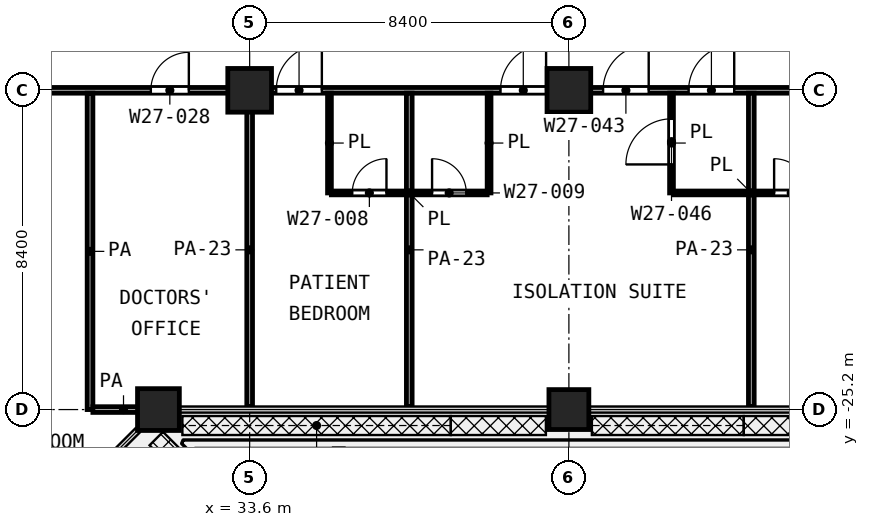
"""IFC4 building model, lengths in metres.
Left out: names, types, materials, properties, quantities, classifications, styles, units other than length and angle.
Written with IfcOpenShell. Run it as: python <this file> out.ifc"""

import sys

from ifc_helpers import new_model, si_unit, direction, frame, frame_2d, origin, origin_2d, place, context, subcontext, project, spatial, rectangle, extrude, element, fill, save


model = new_model("IFC4")
c1 = context("Model", 3, precision=1e-05, world=origin(), true_north=direction((0.0, 1.0)))
c2 = subcontext(c1, "Body", "Model", "MODEL_VIEW")
j1 = project(units=[si_unit("LENGTHUNIT", "METRE"), si_unit("PLANEANGLEUNIT", "RADIAN")], contexts=[c1])
p1 = place(None, origin())
s1 = spatial("IfcSite", under=j1, at=p1, CompositionType="ELEMENT")
p2 = place(p1, origin())
s2 = spatial("IfcBuilding", under=s1, at=p2, CompositionType="ELEMENT")
p3 = place(p2, frame((0.0, 0.0, 140.8)))
s3 = spatial("IfcBuildingStorey", under=s2, at=p3, CompositionType="ELEMENT", Elevation=140.8)
for number, where, z_axis, x_axis in (
    (1, (33.6, -16.8, 0.0), (0.0, 0.0, 1.0), (1.0, 0.0, 0.0)),
    (2, (42.0, -16.8, 0.0), (0.0, 0.0, 1.0), (1.0, 0.0, 0.0)),
):
    element("IfcColumn", number, at=place(p3, frame(where, z_axis=z_axis, x_axis=x_axis)), inside=s3, PredefinedType="COLUMN", context=c2, shape_type="SweptSolid", body=[
        extrude(rectangle(XDim=1.15, YDim=1.15, at=origin_2d()), origin(), (0.0, 0.0, 1.0), 4.2),
    ])
p4 = place(p3, frame((31.2, -25.2, 0.0), z_axis=(0.0, 0.0, 1.0), x_axis=(1.0, 0.0, 0.0)))
e3 = element("IfcColumn", 3, at=p4, inside=s3, PredefinedType="COLUMN", context=c2, shape_type="SweptSolid", body=[
    extrude(rectangle(XDim=1.1, YDim=1.1, at=origin_2d()), origin(), (0.0, 0.0, 1.0), 4.2),
])
p5 = place(p3, frame((42.0, -25.2, 0.0), z_axis=(0.0, 0.0, 1.0), x_axis=(1.0, 0.0, 0.0)))
e4 = element("IfcColumn", 4, at=p5, inside=s3, PredefinedType="COLUMN", context=c2, shape_type="SweptSolid", body=[
    extrude(rectangle(XDim=1.05, YDim=1.05, at=origin_2d()), origin(), (0.0, 0.0, 1.0), 4.2),
])
p6 = place(p3, frame((35.75, -19.5, 0.0), z_axis=(0.0, 0.0, 1.0), x_axis=(1.0, 0.0, 0.0)))
e5 = element("IfcWall", 5, at=p6, inside=s3, PredefinedType="PARTITIONING", context=c2, shape_type="SweptSolid", body=[
    extrude(rectangle(XDim=4.1, YDim=0.1, at=frame_2d((2.05, 0.0))), origin(), (0.0, 0.0, 1.0), 3.6),
])
p7 = place(p6, frame((0.55, 0.0, 0.0)))
e6 = element("IfcOpeningElement", 6, at=p7, cuts=e5, PredefinedType="OPENING", context=c2, shape_type="SweptSolid", body=[
    extrude(rectangle(XDim=0.9, YDim=2.1, at=frame_2d((0.45, 1.05))), frame((0.0, 0.06, 0.0), z_axis=(0.0, -1.0, 0.0), x_axis=(1.0, 0.0, 0.0)), (0.0, 0.0, 1.0), 0.12),
])
p8 = place(p6, frame((2.65, 0.0, 0.0)))
e7 = element("IfcOpeningElement", 7, at=p8, cuts=e5, PredefinedType="OPENING", context=c2, shape_type="SweptSolid", body=[
    extrude(rectangle(XDim=0.9, YDim=2.1, at=frame_2d((0.45, 1.05))), frame((0.0, 0.06, 0.0), z_axis=(0.0, -1.0, 0.0), x_axis=(1.0, 0.0, 0.0)), (0.0, 0.0, 1.0), 0.12),
])
p9 = place(p3, frame((44.75, -19.5, 0.0), z_axis=(0.0, 0.0, 1.0), x_axis=(1.0, 0.0, 0.0)))
e8 = element("IfcWall", 8, at=p9, inside=s3, PredefinedType="PARTITIONING", context=c2, shape_type="SweptSolid", body=[
    extrude(rectangle(XDim=4.1, YDim=0.1, at=frame_2d((2.05, 0.0))), origin(), (0.0, 0.0, 1.0), 3.6),
])
p10 = place(p9, frame((2.65, 0.0, 0.0)))
e9 = element("IfcOpeningElement", 9, at=p10, cuts=e8, PredefinedType="OPENING", context=c2, shape_type="SweptSolid", body=[
    extrude(rectangle(XDim=0.9, YDim=2.1, at=frame_2d((0.45, 1.05))), frame((0.0, 0.06, 0.0), z_axis=(0.0, -1.0, 0.0), x_axis=(1.0, 0.0, 0.0)), (0.0, 0.0, 1.0), 0.12),
])
for number, where, z_axis, x_axis in (
    (10, (35.7, -19.5, 0.0), (0.0, 0.0, 1.0), (0.0, 1.0, 0.0)),
    (11, (39.9, -19.5, 0.0), (0.0, 0.0, 1.0), (0.0, 1.0, 0.0)),
):
    element("IfcWall", number, at=place(p3, frame(where, z_axis=z_axis, x_axis=x_axis)), inside=s3, PredefinedType="PARTITIONING", context=c2, shape_type="SweptSolid", body=[
        extrude(rectangle(XDim=2.625, YDim=0.1, at=frame_2d((1.312, 0.0))), origin(), (0.0, 0.0, 1.0), 3.6),
    ])
p11 = place(p3, frame((44.7, -19.5, 0.0), z_axis=(0.0, 0.0, 1.0), x_axis=(0.0, 1.0, 0.0)))
e12 = element("IfcWall", 12, at=p11, inside=s3, PredefinedType="PARTITIONING", context=c2, shape_type="SweptSolid", body=[
    extrude(rectangle(XDim=2.625, YDim=0.1, at=frame_2d((1.312, 0.0))), origin(), (0.0, 0.0, 1.0), 3.6),
])
p12 = place(p11, frame((0.75, 0.0, 0.0)))
e13 = element("IfcOpeningElement", 13, at=p12, cuts=e12, PredefinedType="OPENING", context=c2, shape_type="SweptSolid", body=[
    extrude(rectangle(XDim=1.2, YDim=2.1, at=frame_2d((0.6, 1.05))), frame((0.0, 0.06, 0.0), z_axis=(0.0, -1.0, 0.0), x_axis=(1.0, 0.0, 0.0)), (0.0, 0.0, 1.0), 0.12),
])
p13 = place(p3, frame((29.475, -25.2, 0.0), z_axis=(0.0, 0.0, 1.0), x_axis=(1.0, 0.0, 0.0)))
e14 = element("IfcWall", 14, at=p13, inside=s3, PredefinedType="PARTITIONING", context=c2, shape_type="SweptSolid", body=[
    extrude(rectangle(XDim=1.612, YDim=0.15, at=frame_2d((0.806, 0.0))), origin(), (0.0, 0.0, 1.0), 3.6),
])
p14 = place(p3, frame((25.0, -16.8, 0.0), z_axis=(0.0, 0.0, 1.0), x_axis=(1.0, 0.0, 0.0)))
e15 = element("IfcWall", 15, at=p14, inside=s3, PredefinedType="PARTITIONING", context=c2, shape_type="SweptSolid", body=[
    extrude(rectangle(XDim=50.52, YDim=0.15, at=frame_2d((25.26, 0.0))), origin(), (0.0, 0.0, 1.0), 3.6),
])
p15 = place(p14, frame((1.55, 0.0, 0.0)))
e16 = element("IfcOpeningElement", 16, at=p15, cuts=e15, PredefinedType="OPENING", context=c2, shape_type="SweptSolid", body=[
    extrude(rectangle(XDim=1.5, YDim=2.1, at=frame_2d((0.75, 1.05))), frame((0.0, 0.085, 0.0), z_axis=(0.0, -1.0, 0.0), x_axis=(1.0, 0.0, 0.0)), (0.0, 0.0, 1.0), 0.17),
])
p16 = place(p14, frame((6.0, 0.0, 0.0)))
e17 = element("IfcOpeningElement", 17, at=p16, cuts=e15, PredefinedType="OPENING", context=c2, shape_type="SweptSolid", body=[
    extrude(rectangle(XDim=1.0, YDim=2.1, at=frame_2d((0.5, 1.05))), frame((0.0, 0.085, 0.0), z_axis=(0.0, -1.0, 0.0), x_axis=(1.0, 0.0, 0.0)), (0.0, 0.0, 1.0), 0.17),
])
p17 = place(p14, frame((9.3, 0.0, 0.0)))
e18 = element("IfcOpeningElement", 18, at=p17, cuts=e15, PredefinedType="OPENING", context=c2, shape_type="SweptSolid", body=[
    extrude(rectangle(XDim=1.2, YDim=2.1, at=frame_2d((0.6, 1.05))), frame((0.0, 0.085, 0.0), z_axis=(0.0, -1.0, 0.0), x_axis=(1.0, 0.0, 0.0)), (0.0, 0.0, 1.0), 0.17),
])
p18 = place(p14, frame((17.9, 0.0, 0.0)))
e19 = element("IfcOpeningElement", 19, at=p18, cuts=e15, PredefinedType="OPENING", context=c2, shape_type="SweptSolid", body=[
    extrude(rectangle(XDim=1.2, YDim=2.1, at=frame_2d((0.6, 1.05))), frame((0.0, 0.085, 0.0), z_axis=(0.0, -1.0, 0.0), x_axis=(1.0, 0.0, 0.0)), (0.0, 0.0, 1.0), 0.17),
])
p19 = place(p14, frame((15.2, 0.0, 0.0)))
e20 = element("IfcOpeningElement", 20, at=p19, cuts=e15, PredefinedType="OPENING", context=c2, shape_type="SweptSolid", body=[
    extrude(rectangle(XDim=1.2, YDim=2.1, at=frame_2d((0.6, 1.05))), frame((0.0, 0.085, 0.0), z_axis=(0.0, -1.0, 0.0), x_axis=(1.0, 0.0, 0.0)), (0.0, 0.0, 1.0), 0.17),
])
p20 = place(p14, frame((20.15, 0.0, 0.0)))
e21 = element("IfcOpeningElement", 21, at=p20, cuts=e15, PredefinedType="OPENING", context=c2, shape_type="SweptSolid", body=[
    extrude(rectangle(XDim=1.2, YDim=2.1, at=frame_2d((0.6, 1.05))), frame((0.0, 0.085, 0.0), z_axis=(0.0, -1.0, 0.0), x_axis=(1.0, 0.0, 0.0)), (0.0, 0.0, 1.0), 0.17),
])
p21 = place(p14, frame((26.025, 0.0, 0.0)))
e22 = element("IfcOpeningElement", 22, at=p21, cuts=e15, PredefinedType="OPENING", context=c2, shape_type="SweptSolid", body=[
    extrude(rectangle(XDim=0.9, YDim=2.1, at=frame_2d((0.45, 1.05))), frame((0.0, 0.085, 0.0), z_axis=(0.0, -1.0, 0.0), x_axis=(1.0, 0.0, 0.0)), (0.0, 0.0, 1.0), 0.17),
])
p22 = place(p14, frame((27.65, 0.0, 0.0)))
e23 = element("IfcOpeningElement", 23, at=p22, cuts=e15, PredefinedType="OPENING", context=c2, shape_type="SweptSolid", body=[
    extrude(rectangle(XDim=1.2, YDim=2.1, at=frame_2d((0.6, 1.05))), frame((0.0, 0.085, 0.0), z_axis=(0.0, -1.0, 0.0), x_axis=(1.0, 0.0, 0.0)), (0.0, 0.0, 1.0), 0.17),
])
p23 = place(p14, frame((32.0, 0.0, 0.0)))
e24 = element("IfcOpeningElement", 24, at=p23, cuts=e15, PredefinedType="OPENING", context=c2, shape_type="SweptSolid", body=[
    extrude(rectangle(XDim=1.2, YDim=2.1, at=frame_2d((0.6, 1.05))), frame((0.0, 0.085, 0.0), z_axis=(0.0, -1.0, 0.0), x_axis=(1.0, 0.0, 0.0)), (0.0, 0.0, 1.0), 0.17),
])
p24 = place(p14, frame((34.8, 0.0, 0.0)))
e25 = element("IfcOpeningElement", 25, at=p24, cuts=e15, PredefinedType="OPENING", context=c2, shape_type="SweptSolid", body=[
    extrude(rectangle(XDim=1.2, YDim=2.1, at=frame_2d((0.6, 1.05))), frame((0.0, 0.085, 0.0), z_axis=(0.0, -1.0, 0.0), x_axis=(1.0, 0.0, 0.0)), (0.0, 0.0, 1.0), 0.17),
])
p25 = place(p14, frame((40.625, 0.0, 0.0)))
e26 = element("IfcOpeningElement", 26, at=p25, cuts=e15, PredefinedType="OPENING", context=c2, shape_type="SweptSolid", body=[
    extrude(rectangle(XDim=0.9, YDim=2.1, at=frame_2d((0.45, 1.05))), frame((0.0, 0.085, 0.0), z_axis=(0.0, -1.0, 0.0), x_axis=(1.0, 0.0, 0.0)), (0.0, 0.0, 1.0), 0.17),
])
p26 = place(p14, frame((44.15, 0.0, 0.0)))
e27 = element("IfcOpeningElement", 27, at=p26, cuts=e15, PredefinedType="OPENING", context=c2, shape_type="SweptSolid", body=[
    extrude(rectangle(XDim=1.2, YDim=2.1, at=frame_2d((0.6, 1.05))), frame((0.0, 0.085, 0.0), z_axis=(0.0, -1.0, 0.0), x_axis=(1.0, 0.0, 0.0)), (0.0, 0.0, 1.0), 0.17),
])
p27 = place(p14, frame((47.7, 0.0, 0.0)))
e28 = element("IfcOpeningElement", 28, at=p27, cuts=e15, PredefinedType="OPENING", context=c2, shape_type="SweptSolid", body=[
    extrude(rectangle(XDim=1.0, YDim=2.1, at=frame_2d((0.5, 1.05))), frame((0.0, 0.085, 0.0), z_axis=(0.0, -1.0, 0.0), x_axis=(1.0, 0.0, 0.0)), (0.0, 0.0, 1.0), 0.17),
])
p28 = place(p3, frame((29.4, -25.2, 0.0), z_axis=(0.0, 0.0, 1.0), x_axis=(0.0, 1.0, 0.0)))
e29 = element("IfcWall", 29, at=p28, inside=s3, PredefinedType="PARTITIONING", context=c2, shape_type="SweptSolid", body=[
    extrude(rectangle(XDim=8.325, YDim=0.15, at=frame_2d((4.163, 0.0))), origin(), (0.0, 0.0, 1.0), 3.6),
])
for number, where, z_axis, x_axis in (
    (30, (33.6, -25.12, 0.0), (0.0, 0.0, 1.0), (0.0, 1.0, 0.0)),
    (31, (37.8, -25.12, 0.0), (0.0, 0.0, 1.0), (0.0, 1.0, 0.0)),
    (32, (46.8, -25.12, 0.0), (0.0, 0.0, 1.0), (0.0, 1.0, 0.0)),
):
    element("IfcWall", number, at=place(p3, frame(where, z_axis=z_axis, x_axis=x_axis)), inside=s3, PredefinedType="PARTITIONING", context=c2, shape_type="SweptSolid", body=[
        extrude(rectangle(XDim=8.245, YDim=0.15, at=frame_2d((4.123, 0.0))), origin(), (0.0, 0.0, 1.0), 2.7),
    ])
p29 = place(p16, origin())
e33 = element("IfcDoor", 33, at=p29, inside=s3, OperationType="SINGLE_SWING_RIGHT", PredefinedType="DOOR", context=c2, shape_type="SweptSolid", body=[
    extrude(rectangle(XDim=1.0, YDim=2.1, at=frame_2d((0.5, 1.05))), frame((0.0, 0.025, 0.0), z_axis=(0.0, -1.0, 0.0), x_axis=(1.0, 0.0, 0.0)), (0.0, 0.0, 1.0), 0.05),
])
fill(e17, e33)
p30 = place(p17, origin())
e34 = element("IfcDoor", 34, at=p30, inside=s3, OperationType="SINGLE_SWING_RIGHT", PredefinedType="DOOR", context=c2, shape_type="SweptSolid", body=[
    extrude(rectangle(XDim=1.2, YDim=2.1, at=frame_2d((0.6, 1.05))), frame((0.0, 0.025, 0.0), z_axis=(0.0, -1.0, 0.0), x_axis=(1.0, 0.0, 0.0)), (0.0, 0.0, 1.0), 0.05),
])
fill(e18, e34)
p31 = place(p7, origin())
e35 = element("IfcDoor", 35, at=p31, inside=s3, OperationType="SINGLE_SWING_RIGHT", PredefinedType="DOOR", context=c2, shape_type="SweptSolid", body=[
    extrude(rectangle(XDim=0.9, YDim=2.1, at=frame_2d((0.45, 1.05))), frame((0.0, 0.025, 0.0), z_axis=(0.0, -1.0, 0.0), x_axis=(1.0, 0.0, 0.0)), (0.0, 0.0, 1.0), 0.05),
])
fill(e6, e35)
p32 = place(p18, origin())
e36 = element("IfcDoor", 36, at=p32, inside=s3, OperationType="SINGLE_SWING_RIGHT", PredefinedType="DOOR", context=c2, shape_type="SweptSolid", body=[
    extrude(rectangle(XDim=1.2, YDim=2.1, at=frame_2d((0.6, 1.05))), frame((0.0, 0.025, 0.0), z_axis=(0.0, -1.0, 0.0), x_axis=(1.0, 0.0, 0.0)), (0.0, 0.0, 1.0), 0.05),
])
fill(e19, e36)
p33 = place(p19, origin())
e37 = element("IfcDoor", 37, at=p33, inside=s3, OperationType="SINGLE_SWING_RIGHT", PredefinedType="DOOR", context=c2, shape_type="SweptSolid", body=[
    extrude(rectangle(XDim=1.2, YDim=2.1, at=frame_2d((0.6, 1.05))), frame((0.0, 0.025, 0.0), z_axis=(0.0, -1.0, 0.0), x_axis=(1.0, 0.0, 0.0)), (0.0, 0.0, 1.0), 0.05),
])
fill(e20, e37)
p34 = place(p20, origin())
e38 = element("IfcDoor", 38, at=p34, inside=s3, OperationType="SINGLE_SWING_RIGHT", PredefinedType="DOOR", context=c2, shape_type="SweptSolid", body=[
    extrude(rectangle(XDim=1.2, YDim=2.1, at=frame_2d((0.6, 1.05))), frame((0.0, 0.025, 0.0), z_axis=(0.0, -1.0, 0.0), x_axis=(1.0, 0.0, 0.0)), (0.0, 0.0, 1.0), 0.05),
])
fill(e21, e38)
p35 = place(p12, origin())
e39 = element("IfcDoor", 39, at=p35, inside=s3, OperationType="SINGLE_SWING_LEFT", PredefinedType="DOOR", context=c2, shape_type="SweptSolid", body=[
    extrude(rectangle(XDim=1.2, YDim=2.1, at=frame_2d((0.6, 1.05))), frame((0.0, 0.025, 0.0), z_axis=(0.0, -1.0, 0.0), x_axis=(1.0, 0.0, 0.0)), (0.0, 0.0, 1.0), 0.05),
])
fill(e13, e39)
p36 = place(p8, origin())
e40 = element("IfcDoor", 40, at=p36, inside=s3, OperationType="SINGLE_SWING_LEFT", PredefinedType="DOOR", context=c2, shape_type="SweptSolid", body=[
    extrude(rectangle(XDim=0.9, YDim=2.1, at=frame_2d((0.45, 1.05))), frame((0.0, 0.025, 0.0), z_axis=(0.0, -1.0, 0.0), x_axis=(1.0, 0.0, 0.0)), (0.0, 0.0, 1.0), 0.05),
])
fill(e7, e40)
p37 = place(p10, origin())
e41 = element("IfcDoor", 41, at=p37, inside=s3, OperationType="SINGLE_SWING_LEFT", PredefinedType="DOOR", context=c2, shape_type="SweptSolid", body=[
    extrude(rectangle(XDim=0.9, YDim=2.1, at=frame_2d((0.45, 1.05))), frame((0.0, 0.025, 0.0), z_axis=(0.0, -1.0, 0.0), x_axis=(1.0, 0.0, 0.0)), (0.0, 0.0, 1.0), 0.05),
])
fill(e9, e41)
save(model, sys.argv[1])
